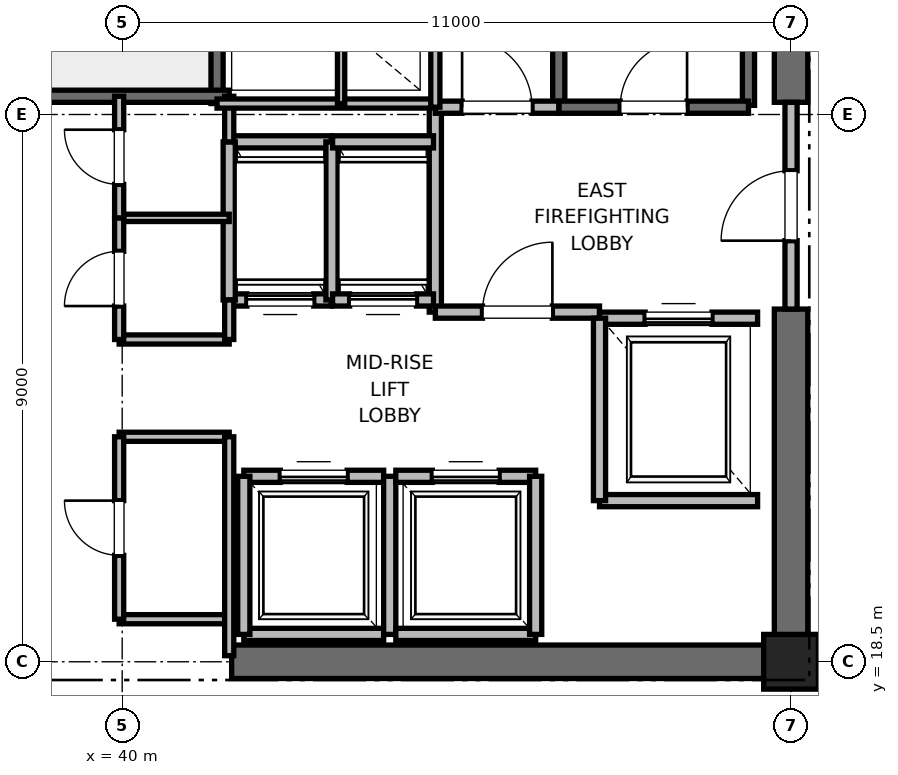
"""IFC4 building model, lengths in metres.
Left out: names, types, materials, properties, quantities, classifications, styles, units other than length and angle.
Written with IfcOpenShell. Run it as: python <this file> out.ifc"""

import sys

from ifc_helpers import new_model, si_unit, direction, frame, frame_2d, origin, origin_2d, place, context, subcontext, project, spatial, rectangle, extrude, element, fill, save


model = new_model("IFC4")
c1 = context("Model", 3, precision=1e-05, world=origin(), true_north=direction((0.0, 1.0)))
c2 = subcontext(c1, "Body", "Model", "MODEL_VIEW")
j1 = project(units=[si_unit("LENGTHUNIT", "METRE"), si_unit("PLANEANGLEUNIT", "RADIAN")], contexts=[c1])
p1 = place(None, origin())
s1 = spatial("IfcSite", under=j1, at=p1, CompositionType="ELEMENT")
p2 = place(p1, origin())
s2 = spatial("IfcBuilding", under=s1, at=p2, CompositionType="ELEMENT")
p3 = place(p2, frame((0.0, 0.0, 233.2)))
s3 = spatial("IfcBuildingStorey", under=s2, at=p3, CompositionType="ELEMENT", Elevation=233.2)
p4 = place(p3, frame((51.0, 18.5, 0.0), z_axis=(0.0, 0.0, 1.0), x_axis=(1.0, 0.0, 0.0)))
e1 = element("IfcColumn", 1, at=p4, inside=s3, PredefinedType="PILASTER", context=c2, shape_type="SweptSolid", body=[
    extrude(rectangle(XDim=0.9, YDim=0.9, at=origin_2d()), origin(), (0.0, 0.0, 1.0), 5.0),
])
p5 = place(p3, frame((41.8, 18.5, 0.0), z_axis=(0.0, 0.0, 1.0), x_axis=(1.0, 0.0, 0.0)))
e2 = element("IfcWall", 2, at=p5, inside=s3, PredefinedType="SHEAR", context=c2, shape_type="SweptSolid", body=[
    extrude(rectangle(XDim=9.2, YDim=0.55, at=frame_2d((4.6, 0.0))), origin(), (0.0, 0.0, 1.0), 4.7),
])
p6 = place(p3, frame((51.0, 18.5, 0.0), z_axis=(0.0, 0.0, 1.0), x_axis=(0.0, 1.0, 0.0)))
e3 = element("IfcWall", 3, at=p6, inside=s3, PredefinedType="SHEAR", context=c2, shape_type="SweptSolid", body=[
    extrude(rectangle(XDim=5.8, YDim=0.55, at=frame_2d((2.9, 0.0))), origin(), (0.0, 0.0, 1.0), 4.7),
])
p7 = place(p3, frame((51.0, 27.7, 0.0), z_axis=(0.0, 0.0, 1.0), x_axis=(0.0, 1.0, 0.0)))
e4 = element("IfcWall", 4, at=p7, inside=s3, PredefinedType="SHEAR", context=c2, shape_type="SweptSolid", body=[
    extrude(rectangle(XDim=8.8, YDim=0.55, at=frame_2d((4.4, 0.0))), origin(), (0.0, 0.0, 1.0), 4.7),
])
p8 = place(p3, frame((50.3, 27.65, 0.0), z_axis=(0.0, 0.0, 1.0), x_axis=(0.0, 1.0, 0.0)))
e5 = element("IfcWall", 5, at=p8, inside=s3, PredefinedType="SOLIDWALL", context=c2, shape_type="SweptSolid", body=[
    extrude(rectangle(XDim=8.15, YDim=0.2, at=frame_2d((4.075, 0.0))), origin(), (0.0, 0.0, 1.0), 4.7),
])
p9 = place(p3, frame((47.18, 27.62, 0.0), z_axis=(0.0, 0.0, 1.0), x_axis=(0.0, 1.0, 0.0)))
e6 = element("IfcWall", 6, at=p9, inside=s3, PredefinedType="SOLIDWALL", context=c2, shape_type="SweptSolid", body=[
    extrude(rectangle(XDim=8.18, YDim=0.2, at=frame_2d((4.09, 0.0))), origin(), (0.0, 0.0, 1.0), 4.7),
])
p10 = place(p3, frame((47.18, 27.62, 0.0), z_axis=(0.0, 0.0, 1.0), x_axis=(1.0, 0.0, 0.0)))
e7 = element("IfcWall", 7, at=p10, inside=s3, PredefinedType="SOLIDWALL", context=c2, shape_type="SweptSolid", body=[
    extrude(rectangle(XDim=3.12, YDim=0.2, at=frame_2d((1.56, 0.0))), origin(), (0.0, 0.0, 1.0), 4.7),
])
p11 = place(p10, frame((1.01, 0.0, 0.0)))
e8 = element("IfcOpeningElement", 8, at=p11, cuts=e7, PredefinedType="OPENING", context=c2, shape_type="SweptSolid", body=[
    extrude(rectangle(XDim=1.1, YDim=2.15, at=frame_2d((0.55, 1.075))), frame((0.0, 0.1, 0.0), z_axis=(0.0, -1.0, 0.0), x_axis=(1.0, 0.0, 0.0)), (0.0, 0.0, 1.0), 0.2),
])
p12 = place(p3, frame((41.56, 27.68, 0.0), z_axis=(0.0, 0.0, 1.0), x_axis=(0.0, 1.0, 0.0)))
e9 = element("IfcWall", 9, at=p12, inside=s3, PredefinedType="SOLIDWALL", context=c2, shape_type="SweptSolid", body=[
    extrude(rectangle(XDim=8.57, YDim=0.2, at=frame_2d((4.285, 0.0))), origin(), (0.0, 0.0, 1.0), 4.7),
])
p13 = place(p3, frame((38.44, 27.8, 0.0), z_axis=(0.0, 0.0, 1.0), x_axis=(1.0, 0.0, 0.0)))
e10 = element("IfcWall", 10, at=p13, inside=s3, PredefinedType="SOLIDWALL", context=c2, shape_type="SweptSolid", body=[
    extrude(rectangle(XDim=3.32, YDim=0.2, at=frame_2d((1.66, 0.0))), origin(), (0.0, 0.0, 1.0), 4.7),
])
p14 = place(p3, frame((45.15, 24.25, 0.0), z_axis=(0.0, 0.0, 1.0), x_axis=(0.0, 1.0, 0.0)))
e11 = element("IfcWall", 11, at=p14, inside=s3, PredefinedType="PARTITIONING", context=c2, shape_type="SweptSolid", body=[
    extrude(rectangle(XDim=3.37, YDim=0.2, at=frame_2d((1.685, 0.0))), origin(), (0.0, 0.0, 1.0), 4.7),
])
p15 = place(p3, frame((45.15, 24.25, 0.0), z_axis=(0.0, 0.0, 1.0), x_axis=(1.0, 0.0, 0.0)))
e12 = element("IfcWall", 12, at=p15, inside=s3, PredefinedType="PARTITIONING", context=c2, shape_type="SweptSolid", body=[
    extrude(rectangle(XDim=2.7, YDim=0.2, at=frame_2d((1.35, 0.0))), origin(), (0.0, 0.0, 1.0), 4.7),
])
p16 = place(p15, frame((0.775, 0.0, 0.0)))
e13 = element("IfcOpeningElement", 13, at=p16, cuts=e12, PredefinedType="OPENING", context=c2, shape_type="SweptSolid", body=[
    extrude(rectangle(XDim=1.15, YDim=2.2, at=frame_2d((0.575, 1.1))), frame((0.0, 0.1, 0.0), z_axis=(0.0, -1.0, 0.0), x_axis=(1.0, 0.0, 0.0)), (0.0, 0.0, 1.0), 0.2),
])
p17 = place(p3, frame((45.15, 27.62, 0.0), z_axis=(0.0, 0.0, 1.0), x_axis=(1.0, 0.0, 0.0)))
e14 = element("IfcWall", 14, at=p17, inside=s3, PredefinedType="PARTITIONING", context=c2, shape_type="SweptSolid", body=[
    extrude(rectangle(XDim=2.03, YDim=0.2, at=frame_2d((1.015, 0.0))), origin(), (0.0, 0.0, 1.0), 4.7),
])
p18 = place(p17, frame((0.44, 0.0, 0.0)))
e15 = element("IfcOpeningElement", 15, at=p18, cuts=e14, PredefinedType="OPENING", context=c2, shape_type="SweptSolid", body=[
    extrude(rectangle(XDim=1.15, YDim=2.2, at=frame_2d((0.575, 1.1))), frame((0.0, 0.1, 0.0), z_axis=(0.0, -1.0, 0.0), x_axis=(1.0, 0.0, 0.0)), (0.0, 0.0, 1.0), 0.2),
])
p19 = place(p3, frame((51.0, 24.3, 0.0), z_axis=(0.0, 0.0, 1.0), x_axis=(0.0, 1.0, 0.0)))
e16 = element("IfcWall", 16, at=p19, inside=s3, PredefinedType="PARTITIONING", context=c2, shape_type="SweptSolid", body=[
    extrude(rectangle(XDim=3.4, YDim=0.2, at=frame_2d((1.7, 0.0))), origin(), (0.0, 0.0, 1.0), 3.68),
])
p20 = place(p19, frame((1.125, 0.0, 0.0)))
e17 = element("IfcOpeningElement", 17, at=p20, cuts=e16, PredefinedType="OPENING", context=c2, shape_type="SweptSolid", body=[
    extrude(rectangle(XDim=1.15, YDim=2.2, at=frame_2d((0.575, 1.1))), frame((0.0, 0.1, 0.0), z_axis=(0.0, -1.0, 0.0), x_axis=(1.0, 0.0, 0.0)), (0.0, 0.0, 1.0), 0.2),
])
p21 = place(p3, frame((47.85, 21.15, 0.0), z_axis=(0.0, 0.0, 1.0), x_axis=(1.0, 0.0, 0.0)))
e18 = element("IfcWall", 18, at=p21, inside=s3, PredefinedType="SOLIDWALL", context=c2, shape_type="SweptSolid", body=[
    extrude(rectangle(XDim=2.6, YDim=0.2, at=frame_2d((1.3, 0.0))), origin(), (0.0, 0.0, 1.0), 4.7),
])
p22 = place(p3, frame((50.45, 24.15, 0.0), z_axis=(0.0, 0.0, 1.0), x_axis=(-1.0, 0.0, 0.0)))
e19 = element("IfcWall", 19, at=p22, inside=s3, PredefinedType="SOLIDWALL", context=c2, shape_type="SweptSolid", body=[
    extrude(rectangle(XDim=2.6, YDim=0.2, at=frame_2d((1.3, 0.0))), origin(), (0.0, 0.0, 1.0), 3.68),
])
p23 = place(p22, frame((0.75, 0.0, 0.0)))
e20 = element("IfcOpeningElement", 20, at=p23, cuts=e19, PredefinedType="OPENING", context=c2, shape_type="SweptSolid", body=[
    extrude(rectangle(XDim=1.1, YDim=2.2, at=frame_2d((0.55, 1.1))), frame((0.0, 0.1, 0.0), z_axis=(0.0, -1.0, 0.0), x_axis=(1.0, 0.0, 0.0)), (0.0, 0.0, 1.0), 0.2),
])
p24 = place(p3, frame((47.85, 24.15, 0.0), z_axis=(0.0, 0.0, 1.0), x_axis=(0.0, -1.0, 0.0)))
e21 = element("IfcWall", 21, at=p24, inside=s3, PredefinedType="SOLIDWALL", context=c2, shape_type="SweptSolid", body=[
    extrude(rectangle(XDim=3.0, YDim=0.2, at=frame_2d((1.5, 0.0))), origin(), (0.0, 0.0, 1.0), 4.7),
])
p25 = place(p3, frame((42.0, 18.95, 0.0), z_axis=(0.0, 0.0, 1.0), x_axis=(1.0, 0.0, 0.0)))
e22 = element("IfcWall", 22, at=p25, inside=s3, PredefinedType="SOLIDWALL", context=c2, shape_type="SweptSolid", body=[
    extrude(rectangle(XDim=2.3, YDim=0.2, at=frame_2d((1.15, 0.0))), origin(), (0.0, 0.0, 1.0), 3.68),
])
p26 = place(p3, frame((44.3, 21.55, 0.0), z_axis=(0.0, 0.0, 1.0), x_axis=(-1.0, 0.0, 0.0)))
e23 = element("IfcWall", 23, at=p26, inside=s3, PredefinedType="SOLIDWALL", context=c2, shape_type="SweptSolid", body=[
    extrude(rectangle(XDim=2.3, YDim=0.2, at=frame_2d((1.15, 0.0))), origin(), (0.0, 0.0, 1.0), 4.7),
])
p27 = place(p26, frame((0.6, 0.0, 0.0)))
e24 = element("IfcOpeningElement", 24, at=p27, cuts=e23, PredefinedType="OPENING", context=c2, shape_type="SweptSolid", body=[
    extrude(rectangle(XDim=1.1, YDim=2.2, at=frame_2d((0.55, 1.1))), frame((0.0, 0.1, 0.0), z_axis=(0.0, -1.0, 0.0), x_axis=(1.0, 0.0, 0.0)), (0.0, 0.0, 1.0), 0.2),
])
p28 = place(p3, frame((42.0, 21.55, 0.0), z_axis=(0.0, 0.0, 1.0), x_axis=(0.0, -1.0, 0.0)))
e25 = element("IfcWall", 25, at=p28, inside=s3, PredefinedType="SOLIDWALL", context=c2, shape_type="SweptSolid", body=[
    extrude(rectangle(XDim=2.6, YDim=0.2, at=frame_2d((1.3, 0.0))), origin(), (0.0, 0.0, 1.0), 3.68),
])
p29 = place(p3, frame((44.4, 18.95, 0.0), z_axis=(0.0, 0.0, 1.0), x_axis=(0.0, 1.0, 0.0)))
e26 = element("IfcWall", 26, at=p29, inside=s3, PredefinedType="SOLIDWALL", context=c2, shape_type="SweptSolid", body=[
    extrude(rectangle(XDim=2.6, YDim=0.2, at=frame_2d((1.3, 0.0))), origin(), (0.0, 0.0, 1.0), 4.7),
])
p30 = place(p3, frame((44.5, 18.95, 0.0), z_axis=(0.0, 0.0, 1.0), x_axis=(1.0, 0.0, 0.0)))
e27 = element("IfcWall", 27, at=p30, inside=s3, PredefinedType="SOLIDWALL", context=c2, shape_type="SweptSolid", body=[
    extrude(rectangle(XDim=2.3, YDim=0.2, at=frame_2d((1.15, 0.0))), origin(), (0.0, 0.0, 1.0), 4.7),
])
p31 = place(p3, frame((46.8, 21.55, 0.0), z_axis=(0.0, 0.0, 1.0), x_axis=(-1.0, 0.0, 0.0)))
e28 = element("IfcWall", 28, at=p31, inside=s3, PredefinedType="SOLIDWALL", context=c2, shape_type="SweptSolid", body=[
    extrude(rectangle(XDim=2.3, YDim=0.2, at=frame_2d((1.15, 0.0))), origin(), (0.0, 0.0, 1.0), 4.7),
])
p32 = place(p31, frame((0.6, 0.0, 0.0)))
e29 = element("IfcOpeningElement", 29, at=p32, cuts=e28, PredefinedType="OPENING", context=c2, shape_type="SweptSolid", body=[
    extrude(rectangle(XDim=1.1, YDim=2.2, at=frame_2d((0.55, 1.1))), frame((0.0, 0.1, 0.0), z_axis=(0.0, -1.0, 0.0), x_axis=(1.0, 0.0, 0.0)), (0.0, 0.0, 1.0), 0.2),
])
p33 = place(p3, frame((46.8, 18.95, 0.0), z_axis=(0.0, 0.0, 1.0), x_axis=(0.0, 1.0, 0.0)))
e30 = element("IfcWall", 30, at=p33, inside=s3, PredefinedType="SOLIDWALL", context=c2, shape_type="SweptSolid", body=[
    extrude(rectangle(XDim=2.6, YDim=0.2, at=frame_2d((1.3, 0.0))), origin(), (0.0, 0.0, 1.0), 4.7),
])
p34 = place(p3, frame((41.76, 24.45, 0.0), z_axis=(0.0, 0.0, 1.0), x_axis=(1.0, 0.0, 0.0)))
e31 = element("IfcWall", 31, at=p34, inside=s3, PredefinedType="SOLIDWALL", context=c2, shape_type="SweptSolid", body=[
    extrude(rectangle(XDim=1.68, YDim=0.2, at=frame_2d((0.84, 0.0))), origin(), (0.0, 0.0, 1.0), 4.7),
])
p35 = place(p34, frame((0.29, 0.0, 0.0)))
e32 = element("IfcOpeningElement", 32, at=p35, cuts=e31, PredefinedType="OPENING", context=c2, shape_type="SweptSolid", body=[
    extrude(rectangle(XDim=1.1, YDim=2.2, at=frame_2d((0.55, 1.1))), frame((0.0, 0.1, 0.0), z_axis=(0.0, -1.0, 0.0), x_axis=(1.0, 0.0, 0.0)), (0.0, 0.0, 1.0), 0.2),
])
p36 = place(p3, frame((43.44, 27.05, 0.0), z_axis=(0.0, 0.0, 1.0), x_axis=(-1.0, 0.0, 0.0)))
e33 = element("IfcWall", 33, at=p36, inside=s3, PredefinedType="SOLIDWALL", context=c2, shape_type="SweptSolid", body=[
    extrude(rectangle(XDim=1.68, YDim=0.2, at=frame_2d((0.84, 0.0))), origin(), (0.0, 0.0, 1.0), 4.7),
])
for number, where, z_axis, x_axis in (
    (34, (41.76, 27.05, 0.0), (0.0, 0.0, 1.0), (0.0, -1.0, 0.0)),
    (35, (43.45, 24.45, 0.0), (0.0, 0.0, 1.0), (0.0, 1.0, 0.0)),
):
    element("IfcWall", number, at=place(p3, frame(where, z_axis=z_axis, x_axis=x_axis)), inside=s3, PredefinedType="SOLIDWALL", context=c2, shape_type="SweptSolid", body=[
        extrude(rectangle(XDim=2.6, YDim=0.2, at=frame_2d((1.3, 0.0))), origin(), (0.0, 0.0, 1.0), 4.7),
    ])
p37 = place(p3, frame((43.46, 24.45, 0.0), z_axis=(0.0, 0.0, 1.0), x_axis=(1.0, 0.0, 0.0)))
e36 = element("IfcWall", 36, at=p37, inside=s3, PredefinedType="SOLIDWALL", context=c2, shape_type="SweptSolid", body=[
    extrude(rectangle(XDim=1.66, YDim=0.2, at=frame_2d((0.83, 0.0))), origin(), (0.0, 0.0, 1.0), 4.7),
])
p38 = place(p37, frame((0.28, 0.0, 0.0)))
e37 = element("IfcOpeningElement", 37, at=p38, cuts=e36, PredefinedType="OPENING", context=c2, shape_type="SweptSolid", body=[
    extrude(rectangle(XDim=1.1, YDim=2.2, at=frame_2d((0.55, 1.1))), frame((0.0, 0.1, 0.0), z_axis=(0.0, -1.0, 0.0), x_axis=(1.0, 0.0, 0.0)), (0.0, 0.0, 1.0), 0.2),
])
p39 = place(p3, frame((45.12, 27.05, 0.0), z_axis=(0.0, 0.0, 1.0), x_axis=(-1.0, 0.0, 0.0)))
e38 = element("IfcWall", 38, at=p39, inside=s3, PredefinedType="SOLIDWALL", context=c2, shape_type="SweptSolid", body=[
    extrude(rectangle(XDim=1.66, YDim=0.2, at=frame_2d((0.83, 0.0))), origin(), (0.0, 0.0, 1.0), 4.7),
])
for number, where, z_axis, x_axis in (
    (39, (39.95, 19.2, 0.0), (0.0, 0.0, 1.0), (1.0, 0.0, 0.0)),
    (40, (39.95, 22.2, 0.0), (0.0, 0.0, 1.0), (1.0, 0.0, 0.0)),
    (41, (39.95, 23.8, 0.0), (0.0, 0.0, 1.0), (1.0, 0.0, 0.0)),
):
    element("IfcWall", number, at=place(p3, frame(where, z_axis=z_axis, x_axis=x_axis)), inside=s3, PredefinedType="PARTITIONING", context=c2, shape_type="SweptSolid", body=[
        extrude(rectangle(XDim=1.81, YDim=0.15, at=frame_2d((0.905, 0.0))), origin(), (0.0, 0.0, 1.0), 2.85),
    ])
p40 = place(p3, frame((39.95, 25.8, 0.0), z_axis=(0.0, 0.0, 1.0), x_axis=(1.0, 0.0, 0.0)))
e42 = element("IfcWall", 42, at=p40, inside=s3, PredefinedType="PARTITIONING", context=c2, shape_type="SweptSolid", body=[
    extrude(rectangle(XDim=1.81, YDim=0.12, at=frame_2d((0.905, 0.0))), origin(), (0.0, 0.0, 1.0), 2.85),
])
p41 = place(p3, frame((41.76, 18.6, 0.0), z_axis=(0.0, 0.0, 1.0), x_axis=(0.0, 1.0, 0.0)))
e43 = element("IfcWall", 43, at=p41, inside=s3, PredefinedType="PARTITIONING", context=c2, shape_type="SweptSolid", body=[
    extrude(rectangle(XDim=3.6, YDim=0.15, at=frame_2d((1.8, 0.0))), origin(), (0.0, 0.0, 1.0), 2.85),
])
p42 = place(p3, frame((41.76, 23.8, 0.0), z_axis=(0.0, 0.0, 1.0), x_axis=(0.0, 1.0, 0.0)))
e44 = element("IfcWall", 44, at=p42, inside=s3, PredefinedType="PARTITIONING", context=c2, shape_type="SweptSolid", body=[
    extrude(rectangle(XDim=0.65, YDim=0.15, at=frame_2d((0.325, 0.0))), origin(), (0.0, 0.0, 1.0), 2.85),
])
p43 = place(p3, frame((41.76, 27.05, 0.0), z_axis=(0.0, 0.0, 1.0), x_axis=(0.0, 1.0, 0.0)))
e45 = element("IfcWall", 45, at=p43, inside=s3, PredefinedType="PARTITIONING", context=c2, shape_type="SweptSolid", body=[
    extrude(rectangle(XDim=0.75, YDim=0.15, at=frame_2d((0.375, 0.0))), origin(), (0.0, 0.0, 1.0), 2.85),
])
p44 = place(p3, frame((39.95, 19.2, 0.0), z_axis=(0.0, 0.0, 1.0), x_axis=(0.0, 1.0, 0.0)))
e46 = element("IfcWall", 46, at=p44, inside=s3, PredefinedType="PARTITIONING", context=c2, shape_type="SweptSolid", body=[
    extrude(rectangle(XDim=3.0, YDim=0.15, at=frame_2d((1.5, 0.0))), origin(), (0.0, 0.0, 1.0), 2.85),
])
p45 = place(p44, frame((1.05, 0.0, 0.0)))
e47 = element("IfcOpeningElement", 47, at=p45, cuts=e46, PredefinedType="OPENING", context=c2, shape_type="SweptSolid", body=[
    extrude(rectangle(XDim=0.9, YDim=2.1, at=frame_2d((0.45, 1.05))), frame((0.0, 0.075, 0.0), z_axis=(0.0, -1.0, 0.0), x_axis=(1.0, 0.0, 0.0)), (0.0, 0.0, 1.0), 0.15),
])
p46 = place(p3, frame((39.95, 23.8, 0.0), z_axis=(0.0, 0.0, 1.0), x_axis=(0.0, 1.0, 0.0)))
e48 = element("IfcWall", 48, at=p46, inside=s3, PredefinedType="PARTITIONING", context=c2, shape_type="SweptSolid", body=[
    extrude(rectangle(XDim=2.0, YDim=0.15, at=frame_2d((1.0, 0.0))), origin(), (0.0, 0.0, 1.0), 2.85),
])
p47 = place(p46, frame((0.55, 0.0, 0.0)))
e49 = element("IfcOpeningElement", 49, at=p47, cuts=e48, PredefinedType="OPENING", context=c2, shape_type="SweptSolid", body=[
    extrude(rectangle(XDim=0.9, YDim=2.1, at=frame_2d((0.45, 1.05))), frame((0.0, 0.075, 0.0), z_axis=(0.0, -1.0, 0.0), x_axis=(1.0, 0.0, 0.0)), (0.0, 0.0, 1.0), 0.15),
])
p48 = place(p3, frame((39.95, 25.8, 0.0), z_axis=(0.0, 0.0, 1.0), x_axis=(0.0, 1.0, 0.0)))
e50 = element("IfcWall", 50, at=p48, inside=s3, PredefinedType="PARTITIONING", context=c2, shape_type="SweptSolid", body=[
    extrude(rectangle(XDim=2.0, YDim=0.15, at=frame_2d((1.0, 0.0))), origin(), (0.0, 0.0, 1.0), 2.85),
])
p49 = place(p48, frame((0.55, 0.0, 0.0)))
e51 = element("IfcOpeningElement", 51, at=p49, cuts=e50, PredefinedType="OPENING", context=c2, shape_type="SweptSolid", body=[
    extrude(rectangle(XDim=0.9, YDim=2.1, at=frame_2d((0.45, 1.05))), frame((0.0, 0.075, 0.0), z_axis=(0.0, -1.0, 0.0), x_axis=(1.0, 0.0, 0.0)), (0.0, 0.0, 1.0), 0.15),
])
p50 = place(p3, frame((41.56, 27.68, 0.0), z_axis=(0.0, 0.0, 1.0), x_axis=(1.0, 0.0, 0.0)))
e52 = element("IfcWall", 52, at=p50, inside=s3, PredefinedType="PARTITIONING", context=c2, shape_type="SweptSolid", body=[
    extrude(rectangle(XDim=3.59, YDim=0.15, at=frame_2d((1.795, 0.0))), origin(), (0.0, 0.0, 1.0), 2.85),
])
p51 = place(p3, frame((45.15, 27.62, 0.0), z_axis=(0.0, 0.0, 1.0), x_axis=(0.0, 1.0, 0.0)))
e53 = element("IfcWall", 53, at=p51, inside=s3, PredefinedType="PARTITIONING", context=c2, shape_type="SweptSolid", body=[
    extrude(rectangle(XDim=3.1, YDim=0.15, at=frame_2d((1.55, 0.0))), origin(), (0.0, 0.0, 1.0), 2.85),
])
p52 = place(p3, frame((43.6, 27.68, 0.0), z_axis=(0.0, 0.0, 1.0), x_axis=(0.0, 1.0, 0.0)))
e54 = element("IfcWall", 54, at=p52, inside=s3, PredefinedType="PARTITIONING", context=c2, shape_type="SweptSolid", body=[
    extrude(rectangle(XDim=3.04, YDim=0.12, at=frame_2d((1.52, 0.0))), origin(), (0.0, 0.0, 1.0), 2.85),
])
p53 = place(p11, origin())
e55 = element("IfcDoor", 55, at=p53, inside=s3, OperationType="SINGLE_SWING_RIGHT", PredefinedType="DOOR", context=c2, shape_type="SweptSolid", body=[
    extrude(rectangle(XDim=1.1, YDim=2.15, at=frame_2d((0.55, 1.075))), frame((0.0, 0.025, 0.0), z_axis=(0.0, -1.0, 0.0), x_axis=(1.0, 0.0, 0.0)), (0.0, 0.0, 1.0), 0.05),
])
fill(e8, e55)
p54 = place(p16, origin())
e56 = element("IfcDoor", 56, at=p54, inside=s3, OperationType="SINGLE_SWING_RIGHT", PredefinedType="DOOR", context=c2, shape_type="SweptSolid", body=[
    extrude(rectangle(XDim=1.15, YDim=2.2, at=frame_2d((0.575, 1.1))), frame((0.0, 0.025, 0.0), z_axis=(0.0, -1.0, 0.0), x_axis=(1.0, 0.0, 0.0)), (0.0, 0.0, 1.0), 0.05),
])
fill(e13, e56)
p55 = place(p18, origin())
e57 = element("IfcDoor", 57, at=p55, inside=s3, OperationType="SINGLE_SWING_LEFT", PredefinedType="DOOR", context=c2, shape_type="SweptSolid", body=[
    extrude(rectangle(XDim=1.15, YDim=2.2, at=frame_2d((0.575, 1.1))), frame((0.0, 0.025, 0.0), z_axis=(0.0, -1.0, 0.0), x_axis=(1.0, 0.0, 0.0)), (0.0, 0.0, 1.0), 0.05),
])
fill(e15, e57)
p56 = place(p20, origin())
e58 = element("IfcDoor", 58, at=p56, inside=s3, OperationType="SINGLE_SWING_LEFT", PredefinedType="DOOR", context=c2, shape_type="SweptSolid", body=[
    extrude(rectangle(XDim=1.15, YDim=2.2, at=frame_2d((0.575, 1.1))), frame((0.0, 0.025, 0.0), z_axis=(0.0, -1.0, 0.0), x_axis=(1.0, 0.0, 0.0)), (0.0, 0.0, 1.0), 0.05),
])
fill(e17, e58)
p57 = place(p23, origin())
e59 = element("IfcDoor", 59, at=p57, inside=s3, OperationType="SLIDING_TO_RIGHT", PredefinedType="DOOR", context=c2, shape_type="SweptSolid", body=[
    extrude(rectangle(XDim=1.1, YDim=2.2, at=frame_2d((0.55, 1.1))), frame((0.0, 0.025, 0.0), z_axis=(0.0, -1.0, 0.0), x_axis=(1.0, 0.0, 0.0)), (0.0, 0.0, 1.0), 0.05),
])
fill(e20, e59)
p58 = place(p27, origin())
e60 = element("IfcDoor", 60, at=p58, inside=s3, OperationType="SLIDING_TO_RIGHT", PredefinedType="DOOR", context=c2, shape_type="SweptSolid", body=[
    extrude(rectangle(XDim=1.1, YDim=2.2, at=frame_2d((0.55, 1.1))), frame((0.0, 0.025, 0.0), z_axis=(0.0, -1.0, 0.0), x_axis=(1.0, 0.0, 0.0)), (0.0, 0.0, 1.0), 0.05),
])
fill(e24, e60)
p59 = place(p32, origin())
e61 = element("IfcDoor", 61, at=p59, inside=s3, OperationType="SLIDING_TO_RIGHT", PredefinedType="DOOR", context=c2, shape_type="SweptSolid", body=[
    extrude(rectangle(XDim=1.1, YDim=2.2, at=frame_2d((0.55, 1.1))), frame((0.0, 0.025, 0.0), z_axis=(0.0, -1.0, 0.0), x_axis=(1.0, 0.0, 0.0)), (0.0, 0.0, 1.0), 0.05),
])
fill(e29, e61)
p60 = place(p35, origin())
e62 = element("IfcDoor", 62, at=p60, inside=s3, OperationType="SLIDING_TO_RIGHT", PredefinedType="DOOR", context=c2, shape_type="SweptSolid", body=[
    extrude(rectangle(XDim=1.1, YDim=2.2, at=frame_2d((0.55, 1.1))), frame((0.0, 0.025, 0.0), z_axis=(0.0, -1.0, 0.0), x_axis=(1.0, 0.0, 0.0)), (0.0, 0.0, 1.0), 0.05),
])
fill(e32, e62)
p61 = place(p38, origin())
e63 = element("IfcDoor", 63, at=p61, inside=s3, OperationType="SLIDING_TO_RIGHT", PredefinedType="DOOR", context=c2, shape_type="SweptSolid", body=[
    extrude(rectangle(XDim=1.1, YDim=2.2, at=frame_2d((0.55, 1.1))), frame((0.0, 0.025, 0.0), z_axis=(0.0, -1.0, 0.0), x_axis=(1.0, 0.0, 0.0)), (0.0, 0.0, 1.0), 0.05),
])
fill(e37, e63)
p62 = place(p45, origin())
e64 = element("IfcDoor", 64, at=p62, inside=s3, OperationType="SINGLE_SWING_RIGHT", PredefinedType="DOOR", context=c2, shape_type="SweptSolid", body=[
    extrude(rectangle(XDim=0.9, YDim=2.1, at=frame_2d((0.45, 1.05))), frame((0.0, 0.025, 0.0), z_axis=(0.0, -1.0, 0.0), x_axis=(1.0, 0.0, 0.0)), (0.0, 0.0, 1.0), 0.05),
])
fill(e47, e64)
p63 = place(p47, origin())
e65 = element("IfcDoor", 65, at=p63, inside=s3, OperationType="SINGLE_SWING_LEFT", PredefinedType="DOOR", context=c2, shape_type="SweptSolid", body=[
    extrude(rectangle(XDim=0.9, YDim=2.1, at=frame_2d((0.45, 1.05))), frame((0.0, 0.025, 0.0), z_axis=(0.0, -1.0, 0.0), x_axis=(1.0, 0.0, 0.0)), (0.0, 0.0, 1.0), 0.05),
])
fill(e49, e65)
p64 = place(p49, origin())
e66 = element("IfcDoor", 66, at=p64, inside=s3, OperationType="SINGLE_SWING_RIGHT", PredefinedType="DOOR", context=c2, shape_type="SweptSolid", body=[
    extrude(rectangle(XDim=0.9, YDim=2.1, at=frame_2d((0.45, 1.05))), frame((0.0, 0.025, 0.0), z_axis=(0.0, -1.0, 0.0), x_axis=(1.0, 0.0, 0.0)), (0.0, 0.0, 1.0), 0.05),
])
fill(e51, e66)
save(model, sys.argv[1])
